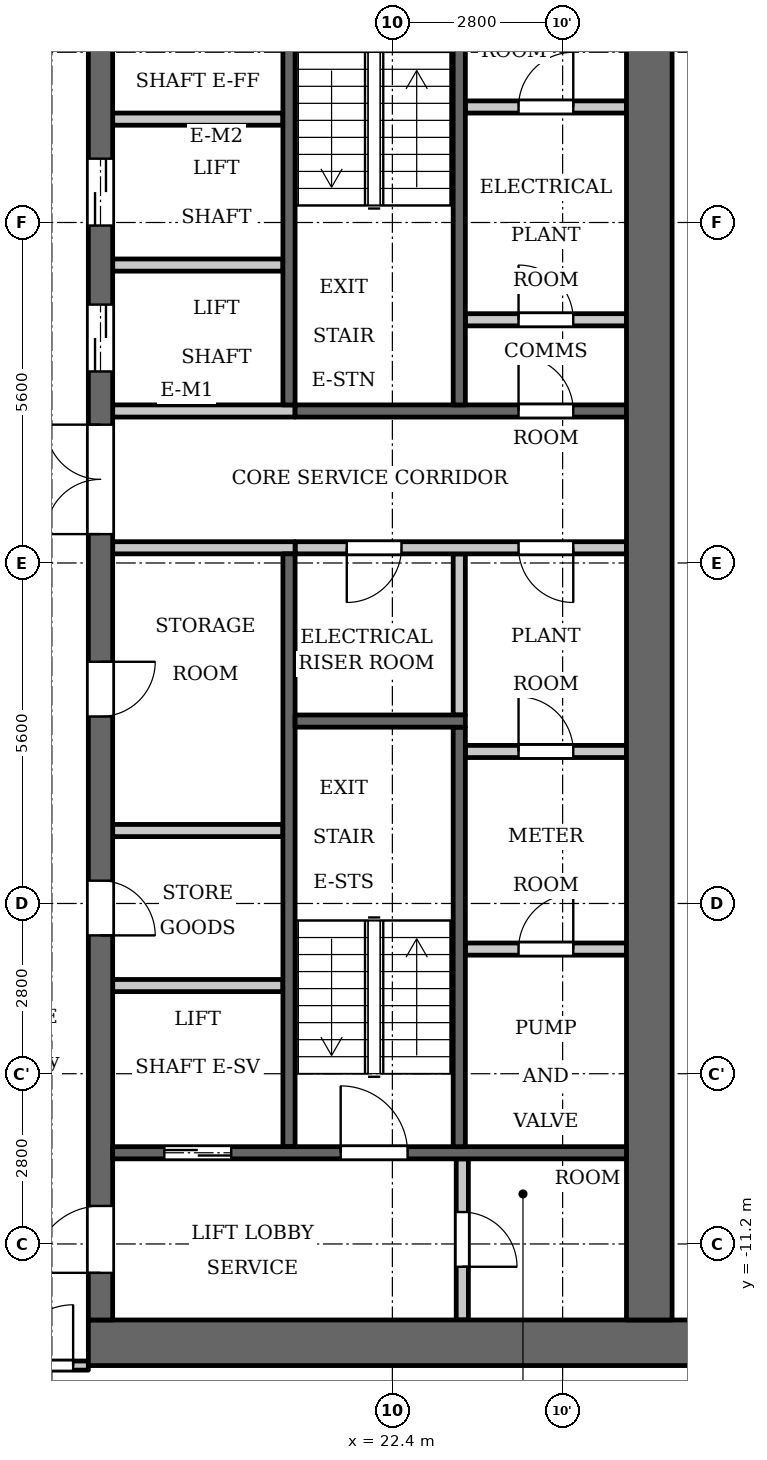
"""IFC4 building model, lengths in metres.
Left out: names, types, materials, properties, quantities, classifications, styles, units other than length and angle.
Written with IfcOpenShell. Run it as: python <this file> out.ifc"""

import sys

from ifc_helpers import new_model, si_unit, direction, frame, frame_2d, origin, place, context, subcontext, project, spatial, rectangle, extrude, element, fill, save


model = new_model("IFC4")
c1 = context("Model", 3, precision=1e-05, world=origin(), true_north=direction((0.0, 1.0)))
c2 = subcontext(c1, "Body", "Model", "MODEL_VIEW")
j1 = project(units=[si_unit("LENGTHUNIT", "METRE"), si_unit("PLANEANGLEUNIT", "RADIAN")], contexts=[c1])
p1 = place(None, origin())
s1 = spatial("IfcSite", under=j1, at=p1, CompositionType="ELEMENT")
p2 = place(p1, origin())
s2 = spatial("IfcBuilding", under=s1, at=p2, CompositionType="ELEMENT")
p3 = place(p2, frame((0.0, 0.0, 153.6)))
s3 = spatial("IfcBuildingStorey", under=s2, at=p3, CompositionType="ELEMENT", Elevation=153.6)
p4 = place(p3, frame((23.5, -2.5, 0.0), z_axis=(0.0, 0.0, 1.0), x_axis=(0.0, 1.0, 0.0)))
e1 = element("IfcWall", 1, at=p4, inside=s3, PredefinedType="PARTITIONING", context=c2, shape_type="SweptSolid", body=[
    extrude(rectangle(XDim=2.65, YDim=0.2, at=frame_2d((1.325, 0.0))), origin(), (0.0, 0.0, 1.0), 3.2),
])
p5 = place(p3, frame((20.7, 2.6, 0.0), z_axis=(0.0, 0.0, 1.0), x_axis=(0.0, 1.0, 0.0)))
e2 = element("IfcWall", 2, at=p5, inside=s3, PredefinedType="SHEAR", context=c2, shape_type="SweptSolid", body=[
    extrude(rectangle(XDim=7.0, YDim=0.2, at=frame_2d((3.5, 0.0))), origin(), (0.0, 0.0, 1.0), 3.2),
])
p6 = place(p3, frame((20.7, -9.6, 0.0), z_axis=(0.0, 0.0, 1.0), x_axis=(0.0, 1.0, 0.0)))
e3 = element("IfcWall", 3, at=p6, inside=s3, PredefinedType="SHEAR", context=c2, shape_type="SweptSolid", body=[
    extrude(rectangle(XDim=9.75, YDim=0.2, at=frame_2d((4.875, 0.0))), origin(), (0.0, 0.0, 1.0), 3.2),
])
p7 = place(p3, frame((20.8, 2.5, 0.0), z_axis=(0.0, 0.0, 1.0), x_axis=(1.0, 0.0, 0.0)))
e4 = element("IfcWall", 4, at=p7, inside=s3, PredefinedType="SHEAR", context=c2, shape_type="SweptSolid", body=[
    extrude(rectangle(XDim=5.45, YDim=0.2, at=frame_2d((2.725, 0.0))), origin(), (0.0, 0.0, 1.0), 3.2),
])
p8 = place(p7, frame((3.675, 0.0, 0.0)))
e5 = element("IfcOpeningElement", 5, at=p8, cuts=e4, PredefinedType="OPENING", context=c2, shape_type="SweptSolid", body=[
    extrude(rectangle(XDim=0.9, YDim=2.1, at=frame_2d((0.45, 1.05))), frame((0.0, 0.11, 0.0), z_axis=(0.0, -1.0, 0.0), x_axis=(1.0, 0.0, 0.0)), (0.0, 0.0, 1.0), 0.22),
])
p9 = place(p3, frame((20.8, 0.25, 0.0), z_axis=(0.0, 0.0, 1.0), x_axis=(1.0, 0.0, 0.0)))
e6 = element("IfcWall", 6, at=p9, inside=s3, PredefinedType="PARTITIONING", context=c2, shape_type="SweptSolid", body=[
    extrude(rectangle(XDim=5.45, YDim=0.2, at=frame_2d((2.725, 0.0))), origin(), (0.0, 0.0, 1.0), 3.2),
])
p10 = place(p9, frame((0.85, 0.0, 0.0)))
e7 = element("IfcOpeningElement", 7, at=p10, cuts=e6, PredefinedType="OPENING", context=c2, shape_type="SweptSolid", body=[
    extrude(rectangle(XDim=0.9, YDim=2.1, at=frame_2d((0.45, 1.05))), frame((0.0, 0.11, 0.0), z_axis=(0.0, -1.0, 0.0), x_axis=(1.0, 0.0, 0.0)), (0.0, 0.0, 1.0), 0.22),
])
p11 = place(p9, frame((3.675, 0.0, 0.0)))
e8 = element("IfcOpeningElement", 8, at=p11, cuts=e6, PredefinedType="OPENING", context=c2, shape_type="SweptSolid", body=[
    extrude(rectangle(XDim=0.9, YDim=2.1, at=frame_2d((0.45, 1.05))), frame((0.0, 0.11, 0.0), z_axis=(0.0, -1.0, 0.0), x_axis=(1.0, 0.0, 0.0)), (0.0, 0.0, 1.0), 0.22),
])
p12 = place(p3, frame((17.4, -12.825, 0.0), z_axis=(0.0, 0.0, 1.0), x_axis=(1.0, 0.0, 0.0)))
e9 = element("IfcWall", 9, at=p12, inside=s3, PredefinedType="SHEAR", context=c2, shape_type="SweptSolid", body=[
    extrude(rectangle(XDim=10.4, YDim=0.75, at=frame_2d((5.2, 0.0))), origin(), (0.0, 0.0, 1.0), 3.2),
])
p13 = place(p3, frame((17.8, -4.4, 0.0), z_axis=(0.0, 0.0, 1.0), x_axis=(1.0, 0.0, 0.0)))
e10 = element("IfcWall", 10, at=p13, inside=s3, PredefinedType="PARTITIONING", context=c2, shape_type="SweptSolid", body=[
    extrude(rectangle(XDim=2.8, YDim=0.2, at=frame_2d((1.4, 0.0))), origin(), (0.0, 0.0, 1.0), 3.2),
])
p14 = place(p3, frame((17.6, -12.45, 0.0), z_axis=(0.0, 0.0, 1.0), x_axis=(0.0, 1.0, 0.0)))
e11 = element("IfcWall", 11, at=p14, inside=s3, PredefinedType="SHEAR", context=c2, shape_type="SweptSolid", body=[
    extrude(rectangle(XDim=24.9, YDim=0.4, at=frame_2d((12.45, 0.0))), origin(), (0.0, 0.0, 1.0), 3.2),
])
p15 = place(p14, frame((6.325, 0.0, 0.0)))
e12 = element("IfcOpeningElement", 12, at=p15, cuts=e11, PredefinedType="OPENING", context=c2, shape_type="SweptSolid", body=[
    extrude(rectangle(XDim=0.9, YDim=2.1, at=frame_2d((0.45, 1.05))), frame((0.0, 0.21, 0.0), z_axis=(0.0, -1.0, 0.0), x_axis=(1.0, 0.0, 0.0)), (0.0, 0.0, 1.0), 0.42),
])
p16 = place(p14, frame((9.925, 0.0, 0.0)))
e13 = element("IfcOpeningElement", 13, at=p16, cuts=e11, PredefinedType="OPENING", context=c2, shape_type="SweptSolid", body=[
    extrude(rectangle(XDim=0.9, YDim=2.1, at=frame_2d((0.45, 1.05))), frame((0.0, 0.21, 0.0), z_axis=(0.0, -1.0, 0.0), x_axis=(1.0, 0.0, 0.0)), (0.0, 0.0, 1.0), 0.42),
])
p17 = place(p14, frame((15.6, 0.0, 0.0)))
e14 = element("IfcOpeningElement", 14, at=p17, cuts=e11, PredefinedType="OPENING", context=c2, shape_type="SweptSolid", body=[
    extrude(rectangle(XDim=1.1, YDim=2.1, at=frame_2d((0.55, 1.05))), frame((0.0, 0.21, 0.0), z_axis=(0.0, -1.0, 0.0), x_axis=(1.0, 0.0, 0.0)), (0.0, 0.0, 1.0), 0.42),
])
p18 = place(p14, frame((18.0, 0.0, 0.0)))
e15 = element("IfcOpeningElement", 15, at=p18, cuts=e11, PredefinedType="OPENING", context=c2, shape_type="SweptSolid", body=[
    extrude(rectangle(XDim=1.1, YDim=2.1, at=frame_2d((0.55, 1.05))), frame((0.0, 0.21, 0.0), z_axis=(0.0, -1.0, 0.0), x_axis=(1.0, 0.0, 0.0)), (0.0, 0.0, 1.0), 0.42),
])
p19 = place(p14, frame((23.025, 0.0, 0.0)))
e16 = element("IfcOpeningElement", 16, at=p19, cuts=e11, PredefinedType="OPENING", context=c2, shape_type="SweptSolid", body=[
    extrude(rectangle(XDim=1.1, YDim=2.1, at=frame_2d((0.55, 1.05))), frame((0.0, 0.21, 0.0), z_axis=(0.0, -1.0, 0.0), x_axis=(1.0, 0.0, 0.0)), (0.0, 0.0, 1.0), 0.42),
])
p20 = place(p14, frame((0.775, 0.0, 0.0)))
e17 = element("IfcOpeningElement", 17, at=p20, cuts=e11, PredefinedType="OPENING", context=c2, shape_type="SweptSolid", body=[
    extrude(rectangle(XDim=1.1, YDim=2.1, at=frame_2d((0.55, 1.05))), frame((0.0, 0.21, 0.0), z_axis=(0.0, -1.0, 0.0), x_axis=(1.0, 0.0, 0.0)), (0.0, 0.0, 1.0), 0.42),
])
p21 = place(p14, frame((12.925, 0.0, 0.0)))
e18 = element("IfcOpeningElement", 18, at=p21, cuts=e11, PredefinedType="OPENING", context=c2, shape_type="SweptSolid", body=[
    extrude(rectangle(XDim=1.8, YDim=2.1, at=frame_2d((0.9, 1.05))), frame((0.0, 0.21, 0.0), z_axis=(0.0, -1.0, 0.0), x_axis=(1.0, 0.0, 0.0)), (0.0, 0.0, 1.0), 0.42),
])
p22 = place(p3, frame((26.625, -12.45, 0.0), z_axis=(0.0, 0.0, 1.0), x_axis=(0.0, 1.0, 0.0)))
e19 = element("IfcWall", 19, at=p22, inside=s3, PredefinedType="SHEAR", context=c2, shape_type="SweptSolid", body=[
    extrude(rectangle(XDim=24.9, YDim=0.75, at=frame_2d((12.45, 0.0))), origin(), (0.0, 0.0, 1.0), 3.2),
])
p23 = place(p3, frame((23.55, -12.45, 0.0), z_axis=(0.0, 0.0, 1.0), x_axis=(0.0, 1.0, 0.0)))
e20 = element("IfcWall", 20, at=p23, inside=s3, PredefinedType="PARTITIONING", context=c2, shape_type="SweptSolid", body=[
    extrude(rectangle(XDim=2.65, YDim=0.2, at=frame_2d((1.325, 0.0))), origin(), (0.0, 0.0, 1.0), 3.2),
])
p24 = place(p23, frame((0.875, 0.0, 0.0)))
e21 = element("IfcOpeningElement", 21, at=p24, cuts=e20, PredefinedType="OPENING", context=c2, shape_type="SweptSolid", body=[
    extrude(rectangle(XDim=0.9, YDim=2.1, at=frame_2d((0.45, 1.05))), frame((0.0, 0.11, 0.0), z_axis=(0.0, -1.0, 0.0), x_axis=(1.0, 0.0, 0.0)), (0.0, 0.0, 1.0), 0.22),
])
p25 = place(p3, frame((23.6, -6.35, 0.0), z_axis=(0.0, 0.0, 1.0), x_axis=(1.0, 0.0, 0.0)))
e22 = element("IfcWall", 22, at=p25, inside=s3, PredefinedType="PARTITIONING", context=c2, shape_type="SweptSolid", body=[
    extrude(rectangle(XDim=2.65, YDim=0.2, at=frame_2d((1.325, 0.0))), origin(), (0.0, 0.0, 1.0), 3.2),
])
p26 = place(p25, frame((0.875, 0.0, 0.0)))
e23 = element("IfcOpeningElement", 23, at=p26, cuts=e22, PredefinedType="OPENING", context=c2, shape_type="SweptSolid", body=[
    extrude(rectangle(XDim=0.9, YDim=2.1, at=frame_2d((0.45, 1.05))), frame((0.0, 0.11, 0.0), z_axis=(0.0, -1.0, 0.0), x_axis=(1.0, 0.0, 0.0)), (0.0, 0.0, 1.0), 0.22),
])
p27 = place(p3, frame((23.6, -3.1, 0.0), z_axis=(0.0, 0.0, 1.0), x_axis=(1.0, 0.0, 0.0)))
e24 = element("IfcWall", 24, at=p27, inside=s3, PredefinedType="PARTITIONING", context=c2, shape_type="SweptSolid", body=[
    extrude(rectangle(XDim=2.65, YDim=0.2, at=frame_2d((1.325, 0.0))), origin(), (0.0, 0.0, 1.0), 3.2),
])
p28 = place(p27, frame((0.875, 0.0, 0.0)))
e25 = element("IfcOpeningElement", 25, at=p28, cuts=e24, PredefinedType="OPENING", context=c2, shape_type="SweptSolid", body=[
    extrude(rectangle(XDim=0.9, YDim=2.1, at=frame_2d((0.45, 1.05))), frame((0.0, 0.11, 0.0), z_axis=(0.0, -1.0, 0.0), x_axis=(1.0, 0.0, 0.0)), (0.0, 0.0, 1.0), 0.22),
])
p29 = place(p3, frame((23.6, 4.0, 0.0), z_axis=(0.0, 0.0, 1.0), x_axis=(1.0, 0.0, 0.0)))
e26 = element("IfcWall", 26, at=p29, inside=s3, PredefinedType="PARTITIONING", context=c2, shape_type="SweptSolid", body=[
    extrude(rectangle(XDim=2.65, YDim=0.2, at=frame_2d((1.325, 0.0))), origin(), (0.0, 0.0, 1.0), 3.2),
])
p30 = place(p29, frame((0.875, 0.0, 0.0)))
e27 = element("IfcOpeningElement", 27, at=p30, cuts=e26, PredefinedType="OPENING", context=c2, shape_type="SweptSolid", body=[
    extrude(rectangle(XDim=0.9, YDim=2.1, at=frame_2d((0.45, 1.05))), frame((0.0, 0.11, 0.0), z_axis=(0.0, -1.0, 0.0), x_axis=(1.0, 0.0, 0.0)), (0.0, 0.0, 1.0), 0.22),
])
p31 = place(p3, frame((23.6, 7.5, 0.0), z_axis=(0.0, 0.0, 1.0), x_axis=(1.0, 0.0, 0.0)))
e28 = element("IfcWall", 28, at=p31, inside=s3, PredefinedType="PARTITIONING", context=c2, shape_type="SweptSolid", body=[
    extrude(rectangle(XDim=2.65, YDim=0.2, at=frame_2d((1.325, 0.0))), origin(), (0.0, 0.0, 1.0), 3.2),
])
p32 = place(p31, frame((0.875, 0.0, 0.0)))
e29 = element("IfcOpeningElement", 29, at=p32, cuts=e28, PredefinedType="OPENING", context=c2, shape_type="SweptSolid", body=[
    extrude(rectangle(XDim=0.9, YDim=2.1, at=frame_2d((0.45, 1.05))), frame((0.0, 0.11, 0.0), z_axis=(0.0, -1.0, 0.0), x_axis=(1.0, 0.0, 0.0)), (0.0, 0.0, 1.0), 0.22),
])
p33 = place(p3, frame((17.8, -9.7, 0.0), z_axis=(0.0, 0.0, 1.0), x_axis=(1.0, 0.0, 0.0)))
e30 = element("IfcWall", 30, at=p33, inside=s3, PredefinedType="SHEAR", context=c2, shape_type="SweptSolid", body=[
    extrude(rectangle(XDim=8.45, YDim=0.2, at=frame_2d((4.225, 0.0))), origin(), (0.0, 0.0, 1.0), 3.2),
])
p34 = place(p33, frame((0.85, 0.0, 0.0)))
e31 = element("IfcOpeningElement", 31, at=p34, cuts=e30, PredefinedType="OPENING", context=c2, shape_type="SweptSolid", body=[
    extrude(rectangle(XDim=1.1, YDim=2.1, at=frame_2d((0.55, 1.05))), frame((0.0, 0.11, 0.0), z_axis=(0.0, -1.0, 0.0), x_axis=(1.0, 0.0, 0.0)), (0.0, 0.0, 1.0), 0.22),
])
p35 = place(p33, frame((3.75, 0.0, 0.0)))
e32 = element("IfcOpeningElement", 32, at=p35, cuts=e30, PredefinedType="OPENING", context=c2, shape_type="SweptSolid", body=[
    extrude(rectangle(XDim=1.1, YDim=2.1, at=frame_2d((0.55, 1.05))), frame((0.0, 0.11, 0.0), z_axis=(0.0, -1.0, 0.0), x_axis=(1.0, 0.0, 0.0)), (0.0, 0.0, 1.0), 0.22),
])
p36 = place(p3, frame((17.8, -6.95, 0.0), z_axis=(0.0, 0.0, 1.0), x_axis=(1.0, 0.0, 0.0)))
e33 = element("IfcWall", 33, at=p36, inside=s3, PredefinedType="PARTITIONING", context=c2, shape_type="SweptSolid", body=[
    extrude(rectangle(XDim=2.8, YDim=0.2, at=frame_2d((1.4, 0.0))), origin(), (0.0, 0.0, 1.0), 3.2),
])
for number, where, z_axis, x_axis in (
    (34, (17.8, 0.25, 0.0), (0.0, 0.0, 1.0), (1.0, 0.0, 0.0)),
    (35, (17.8, 2.5, 0.0), (0.0, 0.0, 1.0), (1.0, 0.0, 0.0)),
):
    element("IfcWall", number, at=place(p3, frame(where, z_axis=z_axis, x_axis=x_axis)), inside=s3, PredefinedType="PARTITIONING", context=c2, shape_type="SweptSolid", body=[
        extrude(rectangle(XDim=3.0, YDim=0.2, at=frame_2d((1.5, 0.0))), origin(), (0.0, 0.0, 1.0), 3.2),
    ])
for number, where, z_axis, x_axis in (
    (36, (17.8, 4.9, 0.0), (0.0, 0.0, 1.0), (1.0, 0.0, 0.0)),
    (37, (17.8, 7.3, 0.0), (0.0, 0.0, 1.0), (1.0, 0.0, 0.0)),
):
    element("IfcWall", number, at=place(p3, frame(where, z_axis=z_axis, x_axis=x_axis)), inside=s3, PredefinedType="PARTITIONING", context=c2, shape_type="SweptSolid", body=[
        extrude(rectangle(XDim=2.8, YDim=0.2, at=frame_2d((1.4, 0.0))), origin(), (0.0, 0.0, 1.0), 3.2),
    ])
p37 = place(p3, frame((23.5, 2.6, 0.0), z_axis=(0.0, 0.0, 1.0), x_axis=(0.0, 1.0, 0.0)))
e38 = element("IfcWall", 38, at=p37, inside=s3, PredefinedType="SHEAR", context=c2, shape_type="SweptSolid", body=[
    extrude(rectangle(XDim=7.0, YDim=0.2, at=frame_2d((3.5, 0.0))), origin(), (0.0, 0.0, 1.0), 3.2),
])
p38 = place(p3, frame((23.5, -9.6, 0.0), z_axis=(0.0, 0.0, 1.0), x_axis=(0.0, 1.0, 0.0)))
e39 = element("IfcWall", 39, at=p38, inside=s3, PredefinedType="SHEAR", context=c2, shape_type="SweptSolid", body=[
    extrude(rectangle(XDim=6.9, YDim=0.2, at=frame_2d((3.45, 0.0))), origin(), (0.0, 0.0, 1.0), 3.2),
])
p39 = place(p3, frame((20.8, -2.6, 0.0), z_axis=(0.0, 0.0, 1.0), x_axis=(1.0, 0.0, 0.0)))
e40 = element("IfcWall", 40, at=p39, inside=s3, PredefinedType="SHEAR", context=c2, shape_type="SweptSolid", body=[
    extrude(rectangle(XDim=2.8, YDim=0.2, at=frame_2d((1.4, 0.0))), origin(), (0.0, 0.0, 1.0), 3.2),
])
p40 = place(p3, frame((-17.4, -13.2, 0.0), z_axis=(0.0, 0.0, 1.0), x_axis=(1.0, 0.0, 0.0)))
e41 = element("IfcWall", 41, at=p40, inside=s3, PredefinedType="PARTITIONING", context=c2, shape_type="SweptSolid", body=[
    extrude(rectangle(XDim=34.8, YDim=0.15, at=frame_2d((17.4, 0.0))), origin(), (0.0, 0.0, 1.0), 3.2),
])
p41 = place(p40, frame((0.15, 0.0, 0.0)))
e42 = element("IfcOpeningElement", 42, at=p41, cuts=e41, PredefinedType="OPENING", context=c2, shape_type="SweptSolid", body=[
    extrude(rectangle(XDim=1.0, YDim=2.1, at=frame_2d((0.5, 1.05))), frame((0.0, 0.085, 0.0), z_axis=(0.0, -1.0, 0.0), x_axis=(1.0, 0.0, 0.0)), (0.0, 0.0, 1.0), 0.17),
])
p42 = place(p40, frame((33.55, 0.0, 0.0)))
e43 = element("IfcOpeningElement", 43, at=p42, cuts=e41, PredefinedType="OPENING", context=c2, shape_type="SweptSolid", body=[
    extrude(rectangle(XDim=1.0, YDim=2.1, at=frame_2d((0.5, 1.05))), frame((0.0, 0.085, 0.0), z_axis=(0.0, -1.0, 0.0), x_axis=(1.0, 0.0, 0.0)), (0.0, 0.0, 1.0), 0.17),
])
p43 = place(p40, frame((15.7, 0.0, 0.0)))
e44 = element("IfcOpeningElement", 44, at=p43, cuts=e41, PredefinedType="OPENING", context=c2, shape_type="SweptSolid", body=[
    extrude(rectangle(XDim=1.0, YDim=2.1, at=frame_2d((0.5, 1.05))), frame((0.0, 0.085, 0.0), z_axis=(0.0, -1.0, 0.0), x_axis=(1.0, 0.0, 0.0)), (0.0, 0.0, 1.0), 0.17),
])
p44 = place(p34, origin())
e45 = element("IfcDoor", 45, at=p44, inside=s3, OperationType="DOUBLE_DOOR_SLIDING", PredefinedType="DOOR", context=c2, shape_type="SweptSolid", body=[
    extrude(rectangle(XDim=1.1, YDim=2.1, at=frame_2d((0.55, 1.05))), frame((0.0, 0.025, 0.0), z_axis=(0.0, -1.0, 0.0), x_axis=(1.0, 0.0, 0.0)), (0.0, 0.0, 1.0), 0.05),
])
fill(e31, e45)
p45 = place(p15, origin())
e46 = element("IfcDoor", 46, at=p45, inside=s3, OperationType="SINGLE_SWING_LEFT", PredefinedType="DOOR", context=c2, shape_type="SweptSolid", body=[
    extrude(rectangle(XDim=0.9, YDim=2.1, at=frame_2d((0.45, 1.05))), frame((0.0, 0.025, 0.0), z_axis=(0.0, -1.0, 0.0), x_axis=(1.0, 0.0, 0.0)), (0.0, 0.0, 1.0), 0.05),
])
fill(e12, e46)
p46 = place(p16, origin())
e47 = element("IfcDoor", 47, at=p46, inside=s3, OperationType="SINGLE_SWING_RIGHT", PredefinedType="DOOR", context=c2, shape_type="SweptSolid", body=[
    extrude(rectangle(XDim=0.9, YDim=2.1, at=frame_2d((0.45, 1.05))), frame((0.0, 0.025, 0.0), z_axis=(0.0, -1.0, 0.0), x_axis=(1.0, 0.0, 0.0)), (0.0, 0.0, 1.0), 0.05),
])
fill(e13, e47)
p47 = place(p17, origin())
e48 = element("IfcDoor", 48, at=p47, inside=s3, OperationType="DOUBLE_DOOR_SLIDING", PredefinedType="DOOR", context=c2, shape_type="SweptSolid", body=[
    extrude(rectangle(XDim=1.1, YDim=2.1, at=frame_2d((0.55, 1.05))), frame((0.0, 0.025, 0.0), z_axis=(0.0, -1.0, 0.0), x_axis=(1.0, 0.0, 0.0)), (0.0, 0.0, 1.0), 0.05),
])
fill(e14, e48)
p48 = place(p18, origin())
e49 = element("IfcDoor", 49, at=p48, inside=s3, OperationType="DOUBLE_DOOR_SLIDING", PredefinedType="DOOR", context=c2, shape_type="SweptSolid", body=[
    extrude(rectangle(XDim=1.1, YDim=2.1, at=frame_2d((0.55, 1.05))), frame((0.0, 0.025, 0.0), z_axis=(0.0, -1.0, 0.0), x_axis=(1.0, 0.0, 0.0)), (0.0, 0.0, 1.0), 0.05),
])
fill(e15, e49)
p49 = place(p20, origin())
e50 = element("IfcDoor", 50, at=p49, inside=s3, OperationType="SINGLE_SWING_RIGHT", PredefinedType="DOOR", context=c2, shape_type="SweptSolid", body=[
    extrude(rectangle(XDim=1.1, YDim=2.1, at=frame_2d((0.55, 1.05))), frame((0.0, 0.025, 0.0), z_axis=(0.0, -1.0, 0.0), x_axis=(1.0, 0.0, 0.0)), (0.0, 0.0, 1.0), 0.05),
])
fill(e17, e50)
p50 = place(p24, origin())
e51 = element("IfcDoor", 51, at=p50, inside=s3, OperationType="SINGLE_SWING_LEFT", PredefinedType="DOOR", context=c2, shape_type="SweptSolid", body=[
    extrude(rectangle(XDim=0.9, YDim=2.1, at=frame_2d((0.45, 1.05))), frame((0.0, 0.025, 0.0), z_axis=(0.0, -1.0, 0.0), x_axis=(1.0, 0.0, 0.0)), (0.0, 0.0, 1.0), 0.05),
])
fill(e21, e51)
p51 = place(p35, origin())
e52 = element("IfcDoor", 52, at=p51, inside=s3, OperationType="SINGLE_SWING_RIGHT", PredefinedType="DOOR", context=c2, shape_type="SweptSolid", body=[
    extrude(rectangle(XDim=1.1, YDim=2.1, at=frame_2d((0.55, 1.05))), frame((0.0, 0.025, 0.0), z_axis=(0.0, -1.0, 0.0), x_axis=(1.0, 0.0, 0.0)), (0.0, 0.0, 1.0), 0.05),
])
fill(e32, e52)
p52 = place(p21, origin())
e53 = element("IfcDoor", 53, at=p52, inside=s3, OperationType="DOUBLE_DOOR_SINGLE_SWING", PredefinedType="DOOR", context=c2, shape_type="SweptSolid", body=[
    extrude(rectangle(XDim=1.8, YDim=2.1, at=frame_2d((0.9, 1.05))), frame((0.0, 0.025, 0.0), z_axis=(0.0, -1.0, 0.0), x_axis=(1.0, 0.0, 0.0)), (0.0, 0.0, 1.0), 0.05),
])
fill(e18, e53)
p53 = place(p10, origin())
e54 = element("IfcDoor", 54, at=p53, inside=s3, OperationType="SINGLE_SWING_LEFT", PredefinedType="DOOR", context=c2, shape_type="SweptSolid", body=[
    extrude(rectangle(XDim=0.9, YDim=2.1, at=frame_2d((0.45, 1.05))), frame((0.0, 0.025, 0.0), z_axis=(0.0, -1.0, 0.0), x_axis=(1.0, 0.0, 0.0)), (0.0, 0.0, 1.0), 0.05),
])
fill(e7, e54)
p54 = place(p26, origin())
e55 = element("IfcDoor", 55, at=p54, inside=s3, OperationType="SINGLE_SWING_LEFT", PredefinedType="DOOR", context=c2, shape_type="SweptSolid", body=[
    extrude(rectangle(XDim=0.9, YDim=2.1, at=frame_2d((0.45, 1.05))), frame((0.0, 0.025, 0.0), z_axis=(0.0, -1.0, 0.0), x_axis=(1.0, 0.0, 0.0)), (0.0, 0.0, 1.0), 0.05),
])
fill(e23, e55)
p55 = place(p28, origin())
e56 = element("IfcDoor", 56, at=p55, inside=s3, OperationType="SINGLE_SWING_RIGHT", PredefinedType="DOOR", context=c2, shape_type="SweptSolid", body=[
    extrude(rectangle(XDim=0.9, YDim=2.1, at=frame_2d((0.45, 1.05))), frame((0.0, 0.025, 0.0), z_axis=(0.0, -1.0, 0.0), x_axis=(1.0, 0.0, 0.0)), (0.0, 0.0, 1.0), 0.05),
])
fill(e25, e56)
p56 = place(p11, origin())
e57 = element("IfcDoor", 57, at=p56, inside=s3, OperationType="SINGLE_SWING_RIGHT", PredefinedType="DOOR", context=c2, shape_type="SweptSolid", body=[
    extrude(rectangle(XDim=0.9, YDim=2.1, at=frame_2d((0.45, 1.05))), frame((0.0, 0.025, 0.0), z_axis=(0.0, -1.0, 0.0), x_axis=(1.0, 0.0, 0.0)), (0.0, 0.0, 1.0), 0.05),
])
fill(e8, e57)
p57 = place(p30, origin())
e58 = element("IfcDoor", 58, at=p57, inside=s3, OperationType="SINGLE_SWING_RIGHT", PredefinedType="DOOR", context=c2, shape_type="SweptSolid", body=[
    extrude(rectangle(XDim=0.9, YDim=2.1, at=frame_2d((0.45, 1.05))), frame((0.0, 0.025, 0.0), z_axis=(0.0, -1.0, 0.0), x_axis=(1.0, 0.0, 0.0)), (0.0, 0.0, 1.0), 0.05),
])
fill(e27, e58)
p58 = place(p32, origin())
e59 = element("IfcDoor", 59, at=p58, inside=s3, OperationType="SINGLE_SWING_LEFT", PredefinedType="DOOR", context=c2, shape_type="SweptSolid", body=[
    extrude(rectangle(XDim=0.9, YDim=2.1, at=frame_2d((0.45, 1.05))), frame((0.0, 0.025, 0.0), z_axis=(0.0, -1.0, 0.0), x_axis=(1.0, 0.0, 0.0)), (0.0, 0.0, 1.0), 0.05),
])
fill(e29, e59)
p59 = place(p8, origin())
e60 = element("IfcDoor", 60, at=p59, inside=s3, OperationType="SINGLE_SWING_RIGHT", PredefinedType="DOOR", context=c2, shape_type="SweptSolid", body=[
    extrude(rectangle(XDim=0.9, YDim=2.1, at=frame_2d((0.45, 1.05))), frame((0.0, 0.025, 0.0), z_axis=(0.0, -1.0, 0.0), x_axis=(1.0, 0.0, 0.0)), (0.0, 0.0, 1.0), 0.05),
])
fill(e5, e60)
p60 = place(p42, origin())
e61 = element("IfcDoor", 61, at=p60, inside=s3, OperationType="SINGLE_SWING_LEFT", PredefinedType="DOOR", context=c2, shape_type="SweptSolid", body=[
    extrude(rectangle(XDim=1.0, YDim=2.1, at=frame_2d((0.5, 1.05))), frame((0.0, 0.025, 0.0), z_axis=(0.0, -1.0, 0.0), x_axis=(1.0, 0.0, 0.0)), (0.0, 0.0, 1.0), 0.05),
])
fill(e43, e61)
save(model, sys.argv[1])
